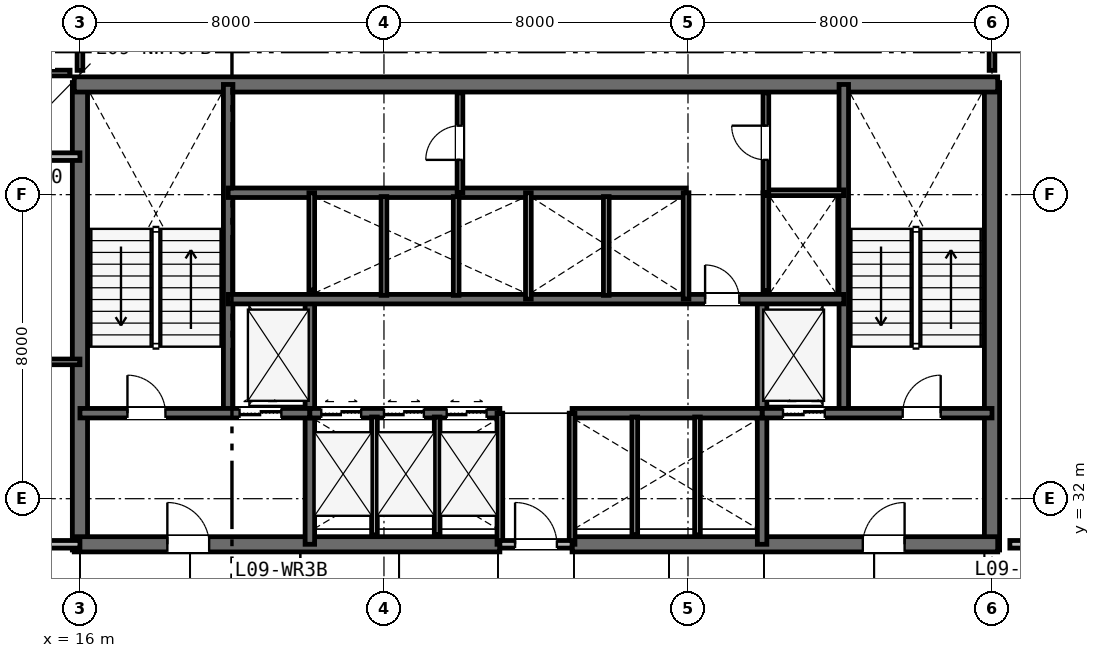
"""IFC4 building model, lengths in metres.
Left out: names, types, materials, properties, quantities, classifications, styles, units other than length and angle.
Written with IfcOpenShell. Run it as: python <this file> out.ifc"""

import sys

from ifc_helpers import new_model, si_unit, direction, frame, frame_2d, origin, place, context, subcontext, project, spatial, rectangle, extrude, element, fill, save


model = new_model("IFC4")
c1 = context("Model", 3, precision=1e-05, world=origin(), true_north=direction((0.0, 1.0)))
c2 = subcontext(c1, "Body", "Model", "MODEL_VIEW")
j1 = project(units=[si_unit("LENGTHUNIT", "METRE"), si_unit("PLANEANGLEUNIT", "RADIAN")], contexts=[c1])
p1 = place(None, origin())
s1 = spatial("IfcSite", under=j1, at=p1, CompositionType="ELEMENT")
p2 = place(p1, origin())
s2 = spatial("IfcBuilding", under=s1, at=p2, CompositionType="ELEMENT")
p3 = place(p2, frame((0.0, 0.0, 40.2)))
s3 = spatial("IfcBuildingStorey", under=s2, at=p3, CompositionType="ELEMENT", Elevation=40.2)
for number, where, z_axis, x_axis in (
    (1, (16.0, 30.65, 0.0), (0.0, 0.0, 1.0), (0.0, 1.0, 0.0)),
    (2, (40.0, 30.65, 0.0), (0.0, 0.0, 1.0), (0.0, 1.0, 0.0)),
):
    element("IfcWall", number, at=place(p3, frame(where, z_axis=z_axis, x_axis=x_axis)), inside=s3, PredefinedType="SHEAR", context=c2, shape_type="SweptSolid", body=[
        extrude(rectangle(XDim=12.3, YDim=0.4, at=frame_2d((6.15, 0.0))), origin(), (0.0, 0.0, 1.0), 3.6),
    ])
p4 = place(p3, frame((15.85, 42.9, 0.0), z_axis=(0.0, 0.0, 1.0), x_axis=(1.0, 0.0, 0.0)))
e3 = element("IfcWall", 3, at=p4, inside=s3, PredefinedType="SHEAR", context=c2, shape_type="SweptSolid", body=[
    extrude(rectangle(XDim=24.3, YDim=0.4, at=frame_2d((12.15, 0.0))), origin(), (0.0, 0.0, 1.0), 3.6),
])
p5 = place(p3, frame((15.85, 30.8, 0.0), z_axis=(0.0, 0.0, 1.0), x_axis=(1.0, 0.0, 0.0)))
e4 = element("IfcWall", 4, at=p5, inside=s3, PredefinedType="SHEAR", context=c2, shape_type="SweptSolid", body=[
    extrude(rectangle(XDim=11.2, YDim=0.4, at=frame_2d((5.6, 0.0))), origin(), (0.0, 0.0, 1.0), 3.6),
])
p6 = place(p5, frame((2.45, 0.0, 0.0)))
e5 = element("IfcOpeningElement", 5, at=p6, cuts=e4, PredefinedType="OPENING", context=c2, shape_type="SweptSolid", body=[
    extrude(rectangle(XDim=1.1, YDim=2.15, at=frame_2d((0.55, 1.075))), frame((0.0, 0.21, 0.0), z_axis=(0.0, -1.0, 0.0), x_axis=(1.0, 0.0, 0.0)), (0.0, 0.0, 1.0), 0.42),
])
p7 = place(p3, frame((28.95, 30.8, 0.0), z_axis=(0.0, 0.0, 1.0), x_axis=(1.0, 0.0, 0.0)))
e6 = element("IfcWall", 6, at=p7, inside=s3, PredefinedType="SHEAR", context=c2, shape_type="SweptSolid", body=[
    extrude(rectangle(XDim=11.2, YDim=0.4, at=frame_2d((5.6, 0.0))), origin(), (0.0, 0.0, 1.0), 3.6),
])
p8 = place(p7, frame((7.65, 0.0, 0.0)))
e7 = element("IfcOpeningElement", 7, at=p8, cuts=e6, PredefinedType="OPENING", context=c2, shape_type="SweptSolid", body=[
    extrude(rectangle(XDim=1.1, YDim=2.15, at=frame_2d((0.55, 1.075))), frame((0.0, 0.21, 0.0), z_axis=(0.0, -1.0, 0.0), x_axis=(1.0, 0.0, 0.0)), (0.0, 0.0, 1.0), 0.42),
])
for number, where, z_axis, x_axis in (
    (8, (19.9, 34.25, 0.0), (0.0, 0.0, 1.0), (0.0, 1.0, 0.0)),
    (9, (36.1, 34.25, 0.0), (0.0, 0.0, 1.0), (0.0, 1.0, 0.0)),
):
    element("IfcWall", number, at=place(p3, frame(where, z_axis=z_axis, x_axis=x_axis)), inside=s3, PredefinedType="SHEAR", context=c2, shape_type="SweptSolid", body=[
        extrude(rectangle(XDim=8.65, YDim=0.25, at=frame_2d((4.325, 0.0))), origin(), (0.0, 0.0, 1.0), 3.6),
    ])
for number, where, z_axis, x_axis in (
    (10, (22.05, 30.8, 0.0), (0.0, 0.0, 1.0), (0.0, 1.0, 0.0)),
    (11, (33.95, 30.8, 0.0), (0.0, 0.0, 1.0), (0.0, 1.0, 0.0)),
):
    element("IfcWall", number, at=place(p3, frame(where, z_axis=z_axis, x_axis=x_axis)), inside=s3, PredefinedType="SHEAR", context=c2, shape_type="SweptSolid", body=[
        extrude(rectangle(XDim=6.45, YDim=0.25, at=frame_2d((3.225, 0.0))), origin(), (0.0, 0.0, 1.0), 3.6),
    ])
p9 = place(p3, frame((16.0, 34.25, 0.0), z_axis=(0.0, 0.0, 1.0), x_axis=(1.0, 0.0, 0.0)))
e12 = element("IfcWall", 12, at=p9, inside=s3, PredefinedType="SHEAR", context=c2, shape_type="SweptSolid", body=[
    extrude(rectangle(XDim=6.05, YDim=0.25, at=frame_2d((3.025, 0.0))), origin(), (0.0, 0.0, 1.0), 3.6),
])
p10 = place(p9, frame((1.25, 0.0, 0.0)))
e13 = element("IfcOpeningElement", 13, at=p10, cuts=e12, PredefinedType="OPENING", context=c2, shape_type="SweptSolid", body=[
    extrude(rectangle(XDim=1.0, YDim=2.15, at=frame_2d((0.5, 1.075))), frame((0.0, 0.135, 0.0), z_axis=(0.0, -1.0, 0.0), x_axis=(1.0, 0.0, 0.0)), (0.0, 0.0, 1.0), 0.27),
])
p11 = place(p9, frame((4.2, 0.0, 0.0)))
e14 = element("IfcOpeningElement", 14, at=p11, cuts=e12, PredefinedType="OPENING", context=c2, shape_type="SweptSolid", body=[
    extrude(rectangle(XDim=1.1, YDim=2.15, at=frame_2d((0.55, 1.075))), frame((0.0, 0.135, 0.0), z_axis=(0.0, -1.0, 0.0), x_axis=(1.0, 0.0, 0.0)), (0.0, 0.0, 1.0), 0.27),
])
p12 = place(p3, frame((33.95, 34.25, 0.0), z_axis=(0.0, 0.0, 1.0), x_axis=(1.0, 0.0, 0.0)))
e15 = element("IfcWall", 15, at=p12, inside=s3, PredefinedType="SHEAR", context=c2, shape_type="SweptSolid", body=[
    extrude(rectangle(XDim=6.05, YDim=0.25, at=frame_2d((3.025, 0.0))), origin(), (0.0, 0.0, 1.0), 3.6),
])
p13 = place(p12, frame((3.7, 0.0, 0.0)))
e16 = element("IfcOpeningElement", 16, at=p13, cuts=e15, PredefinedType="OPENING", context=c2, shape_type="SweptSolid", body=[
    extrude(rectangle(XDim=1.0, YDim=2.15, at=frame_2d((0.5, 1.075))), frame((0.0, 0.135, 0.0), z_axis=(0.0, -1.0, 0.0), x_axis=(1.0, 0.0, 0.0)), (0.0, 0.0, 1.0), 0.27),
])
p14 = place(p12, frame((0.55, 0.0, 0.0)))
e17 = element("IfcOpeningElement", 17, at=p14, cuts=e15, PredefinedType="OPENING", context=c2, shape_type="SweptSolid", body=[
    extrude(rectangle(XDim=1.1, YDim=2.15, at=frame_2d((0.55, 1.075))), frame((0.0, 0.135, 0.0), z_axis=(0.0, -1.0, 0.0), x_axis=(1.0, 0.0, 0.0)), (0.0, 0.0, 1.0), 0.27),
])
p15 = place(p3, frame((22.05, 34.25, 0.0), z_axis=(0.0, 0.0, 1.0), x_axis=(1.0, 0.0, 0.0)))
e18 = element("IfcWall", 18, at=p15, inside=s3, PredefinedType="SHEAR", context=c2, shape_type="SweptSolid", body=[
    extrude(rectangle(XDim=5.0, YDim=0.25, at=frame_2d((2.5, 0.0))), origin(), (0.0, 0.0, 1.0), 3.6),
])
p16 = place(p15, frame((0.3, 0.0, 0.0)))
e19 = element("IfcOpeningElement", 19, at=p16, cuts=e18, PredefinedType="OPENING", context=c2, shape_type="SweptSolid", body=[
    extrude(rectangle(XDim=1.05, YDim=2.15, at=frame_2d((0.525, 1.075))), frame((0.0, 0.135, 0.0), z_axis=(0.0, -1.0, 0.0), x_axis=(1.0, 0.0, 0.0)), (0.0, 0.0, 1.0), 0.27),
])
p17 = place(p15, frame((1.95, 0.0, 0.0)))
e20 = element("IfcOpeningElement", 20, at=p17, cuts=e18, PredefinedType="OPENING", context=c2, shape_type="SweptSolid", body=[
    extrude(rectangle(XDim=1.05, YDim=2.15, at=frame_2d((0.525, 1.075))), frame((0.0, 0.135, 0.0), z_axis=(0.0, -1.0, 0.0), x_axis=(1.0, 0.0, 0.0)), (0.0, 0.0, 1.0), 0.27),
])
p18 = place(p15, frame((3.6, 0.0, 0.0)))
e21 = element("IfcOpeningElement", 21, at=p18, cuts=e18, PredefinedType="OPENING", context=c2, shape_type="SweptSolid", body=[
    extrude(rectangle(XDim=1.05, YDim=2.15, at=frame_2d((0.525, 1.075))), frame((0.0, 0.135, 0.0), z_axis=(0.0, -1.0, 0.0), x_axis=(1.0, 0.0, 0.0)), (0.0, 0.0, 1.0), 0.27),
])
p19 = place(p3, frame((28.95, 34.25, 0.0), z_axis=(0.0, 0.0, 1.0), x_axis=(1.0, 0.0, 0.0)))
e22 = element("IfcWall", 22, at=p19, inside=s3, PredefinedType="SHEAR", context=c2, shape_type="SweptSolid", body=[
    extrude(rectangle(XDim=5.0, YDim=0.25, at=frame_2d((2.5, 0.0))), origin(), (0.0, 0.0, 1.0), 3.6),
])
p20 = place(p3, frame((19.9, 37.25, 0.0), z_axis=(0.0, 0.0, 1.0), x_axis=(1.0, 0.0, 0.0)))
e23 = element("IfcWall", 23, at=p20, inside=s3, PredefinedType="SHEAR", context=c2, shape_type="SweptSolid", body=[
    extrude(rectangle(XDim=16.2, YDim=0.25, at=frame_2d((8.1, 0.0))), origin(), (0.0, 0.0, 1.0), 3.6),
])
p21 = place(p20, frame((12.55, 0.0, 0.0)))
e24 = element("IfcOpeningElement", 24, at=p21, cuts=e23, PredefinedType="OPENING", context=c2, shape_type="SweptSolid", body=[
    extrude(rectangle(XDim=0.9, YDim=2.15, at=frame_2d((0.45, 1.075))), frame((0.0, 0.135, 0.0), z_axis=(0.0, -1.0, 0.0), x_axis=(1.0, 0.0, 0.0)), (0.0, 0.0, 1.0), 0.27),
])
p22 = place(p3, frame((19.9, 40.05, 0.0), z_axis=(0.0, 0.0, 1.0), x_axis=(1.0, 0.0, 0.0)))
e25 = element("IfcWall", 25, at=p22, inside=s3, PredefinedType="SHEAR", context=c2, shape_type="SweptSolid", body=[
    extrude(rectangle(XDim=12.05, YDim=0.25, at=frame_2d((6.025, 0.0))), origin(), (0.0, 0.0, 1.0), 3.6),
])
for number, where, z_axis, x_axis in (
    (26, (27.05, 30.8, 0.0), (0.0, 0.0, 1.0), (0.0, 1.0, 0.0)),
    (27, (28.95, 30.8, 0.0), (0.0, 0.0, 1.0), (0.0, 1.0, 0.0)),
):
    element("IfcWall", number, at=place(p3, frame(where, z_axis=z_axis, x_axis=x_axis)), inside=s3, PredefinedType="PLUMBINGWALL", context=c2, shape_type="SweptSolid", body=[
        extrude(rectangle(XDim=3.45, YDim=0.15, at=frame_2d((1.725, 0.0))), origin(), (0.0, 0.0, 1.0), 3.33),
    ])
p23 = place(p3, frame((27.05, 30.8, 0.0), z_axis=(0.0, 0.0, 1.0), x_axis=(1.0, 0.0, 0.0)))
e28 = element("IfcWall", 28, at=p23, inside=s3, PredefinedType="PARTITIONING", context=c2, shape_type="SweptSolid", body=[
    extrude(rectangle(XDim=1.9, YDim=0.2, at=frame_2d((0.95, 0.0))), origin(), (0.0, 0.0, 1.0), 3.33),
])
p24 = place(p23, frame((0.4, 0.0, 0.0)))
e29 = element("IfcOpeningElement", 29, at=p24, cuts=e28, PredefinedType="OPENING", context=c2, shape_type="SweptSolid", body=[
    extrude(rectangle(XDim=1.1, YDim=2.15, at=frame_2d((0.55, 1.075))), frame((0.0, 0.11, 0.0), z_axis=(0.0, -1.0, 0.0), x_axis=(1.0, 0.0, 0.0)), (0.0, 0.0, 1.0), 0.22),
])
for number, where, z_axis, x_axis in (
    (30, (23.75, 31.05, 0.0), (0.0, 0.0, 1.0), (0.0, 1.0, 0.0)),
    (31, (25.4, 31.05, 0.0), (0.0, 0.0, 1.0), (0.0, 1.0, 0.0)),
    (32, (30.6, 31.05, 0.0), (0.0, 0.0, 1.0), (0.0, 1.0, 0.0)),
    (33, (32.25, 31.05, 0.0), (0.0, 0.0, 1.0), (0.0, 1.0, 0.0)),
):
    element("IfcWall", number, at=place(p3, frame(where, z_axis=z_axis, x_axis=x_axis)), inside=s3, PredefinedType="PLUMBINGWALL", context=c2, shape_type="SweptSolid", body=[
        extrude(rectangle(XDim=3.1, YDim=0.15, at=frame_2d((1.55, 0.0))), origin(), (0.0, 0.0, 1.0), 3.33),
    ])
p25 = place(p3, frame((22.1, 37.49, 0.0), z_axis=(0.0, 0.0, 1.0), x_axis=(0.0, 1.0, 0.0)))
e34 = element("IfcWall", 34, at=p25, inside=s3, PredefinedType="PLUMBINGWALL", context=c2, shape_type="SweptSolid", body=[
    extrude(rectangle(XDim=2.56, YDim=0.15, at=frame_2d((1.28, 0.0))), origin(), (0.0, 0.0, 1.0), 3.33),
])
p26 = place(p3, frame((27.8, 37.25, 0.0), z_axis=(0.0, 0.0, 1.0), x_axis=(0.0, 1.0, 0.0)))
e35 = element("IfcWall", 35, at=p26, inside=s3, PredefinedType="PLUMBINGWALL", context=c2, shape_type="SweptSolid", body=[
    extrude(rectangle(XDim=2.8, YDim=0.15, at=frame_2d((1.4, 0.0))), origin(), (0.0, 0.0, 1.0), 3.33),
])
for number, where, z_axis, x_axis in (
    (36, (24.0, 37.35, 0.0), (0.0, 0.0, 1.0), (0.0, 1.0, 0.0)),
    (37, (25.9, 37.35, 0.0), (0.0, 0.0, 1.0), (0.0, 1.0, 0.0)),
):
    element("IfcWall", number, at=place(p3, frame(where, z_axis=z_axis, x_axis=x_axis)), inside=s3, PredefinedType="PLUMBINGWALL", context=c2, shape_type="SweptSolid", body=[
        extrude(rectangle(XDim=2.6, YDim=0.15, at=frame_2d((1.3, 0.0))), origin(), (0.0, 0.0, 1.0), 3.33),
    ])
p27 = place(p3, frame((31.95, 37.25, 0.0), z_axis=(0.0, 0.0, 1.0), x_axis=(0.0, 1.0, 0.0)))
e38 = element("IfcWall", 38, at=p27, inside=s3, PredefinedType="PLUMBINGWALL", context=c2, shape_type="SweptSolid", body=[
    extrude(rectangle(XDim=2.8, YDim=0.15, at=frame_2d((1.4, 0.0))), origin(), (0.0, 0.0, 1.0), 3.33),
])
p28 = place(p3, frame((29.85, 37.35, 0.0), z_axis=(0.0, 0.0, 1.0), x_axis=(0.0, 1.0, 0.0)))
e39 = element("IfcWall", 39, at=p28, inside=s3, PredefinedType="PLUMBINGWALL", context=c2, shape_type="SweptSolid", body=[
    extrude(rectangle(XDim=2.6, YDim=0.15, at=frame_2d((1.3, 0.0))), origin(), (0.0, 0.0, 1.0), 3.33),
])
p29 = place(p3, frame((34.05, 37.473, 0.0), z_axis=(0.0, 0.0, 1.0), x_axis=(0.0, 1.0, 0.0)))
e40 = element("IfcWall", 40, at=p29, inside=s3, PredefinedType="PLUMBINGWALL", context=c2, shape_type="SweptSolid", body=[
    extrude(rectangle(XDim=2.577, YDim=0.15, at=frame_2d((1.288, 0.0))), origin(), (0.0, 0.0, 1.0), 3.33),
])
p30 = place(p3, frame((34.05, 40.05, 0.0), z_axis=(0.0, 0.0, 1.0), x_axis=(1.0, 0.0, 0.0)))
e41 = element("IfcWall", 41, at=p30, inside=s3, PredefinedType="PARTITIONING", context=c2, shape_type="SweptSolid", body=[
    extrude(rectangle(XDim=2.05, YDim=0.15, at=frame_2d((1.025, 0.0))), origin(), (0.0, 0.0, 1.0), 3.33),
])
p31 = place(p3, frame((34.05, 40.05, 0.0), z_axis=(0.0, 0.0, 1.0), x_axis=(0.0, 1.0, 0.0)))
e42 = element("IfcWall", 42, at=p31, inside=s3, PredefinedType="PARTITIONING", context=c2, shape_type="SweptSolid", body=[
    extrude(rectangle(XDim=2.63, YDim=0.15, at=frame_2d((1.315, 0.0))), origin(), (0.0, 0.0, 1.0), 3.33),
])
p32 = place(p31, frame((0.865, 0.0, 0.0)))
e43 = element("IfcOpeningElement", 43, at=p32, cuts=e42, PredefinedType="OPENING", context=c2, shape_type="SweptSolid", body=[
    extrude(rectangle(XDim=0.9, YDim=2.15, at=frame_2d((0.45, 1.075))), frame((0.0, 0.085, 0.0), z_axis=(0.0, -1.0, 0.0), x_axis=(1.0, 0.0, 0.0)), (0.0, 0.0, 1.0), 0.17),
])
p33 = place(p3, frame((26.0, 40.05, 0.0), z_axis=(0.0, 0.0, 1.0), x_axis=(0.0, 1.0, 0.0)))
e44 = element("IfcWall", 44, at=p33, inside=s3, PredefinedType="PARTITIONING", context=c2, shape_type="SweptSolid", body=[
    extrude(rectangle(XDim=2.63, YDim=0.15, at=frame_2d((1.315, 0.0))), origin(), (0.0, 0.0, 1.0), 3.33),
])
p34 = place(p33, frame((0.865, 0.0, 0.0)))
e45 = element("IfcOpeningElement", 45, at=p34, cuts=e44, PredefinedType="OPENING", context=c2, shape_type="SweptSolid", body=[
    extrude(rectangle(XDim=0.9, YDim=2.15, at=frame_2d((0.45, 1.075))), frame((0.0, 0.085, 0.0), z_axis=(0.0, -1.0, 0.0), x_axis=(1.0, 0.0, 0.0)), (0.0, 0.0, 1.0), 0.17),
])
p35 = place(p3, frame((8.3, 35.6, 0.0), z_axis=(0.0, 0.0, 1.0), x_axis=(1.0, 0.0, 0.0)))
e46 = element("IfcWall", 46, at=p35, inside=s3, PredefinedType="PARTITIONING", context=c2, shape_type="SweptSolid", body=[
    extrude(rectangle(XDim=7.7, YDim=0.15, at=frame_2d((3.85, 0.0))), origin(), (0.0, 0.0, 1.0), 2.82),
])
p36 = place(p3, frame((8.3, 30.8, 0.0), z_axis=(0.0, 0.0, 1.0), x_axis=(1.0, 0.0, 0.0)))
e47 = element("IfcWall", 47, at=p36, inside=s3, PredefinedType="PARTITIONING", context=c2, shape_type="SweptSolid", body=[
    extrude(rectangle(XDim=7.7, YDim=0.2, at=frame_2d((3.85, 0.0))), origin(), (0.0, 0.0, 1.0), 2.82),
])
p37 = place(p36, frame((5.325, 0.0, 0.0)))
e48 = element("IfcOpeningElement", 48, at=p37, cuts=e47, PredefinedType="OPENING", context=c2, shape_type="SweptSolid", body=[
    extrude(rectangle(XDim=0.95, YDim=2.15, at=frame_2d((0.475, 1.075))), frame((0.0, 0.11, 0.0), z_axis=(0.0, -1.0, 0.0), x_axis=(1.0, 0.0, 0.0)), (0.0, 0.0, 1.0), 0.22),
])
p38 = place(p3, frame((0.1, 41.0, 0.0), z_axis=(0.0, 0.0, 1.0), x_axis=(1.0, 0.0, 0.0)))
e49 = element("IfcWall", 49, at=p38, inside=s3, PredefinedType="PARTITIONING", context=c2, shape_type="SweptSolid", body=[
    extrude(rectangle(XDim=15.9, YDim=0.2, at=frame_2d((7.95, 0.0))), origin(), (0.0, 0.0, 1.0), 2.82),
])
p39 = place(p38, frame((6.779, 0.0, 0.0)))
e50 = element("IfcOpeningElement", 50, at=p39, cuts=e49, PredefinedType="OPENING", context=c2, shape_type="SweptSolid", body=[
    extrude(rectangle(XDim=0.95, YDim=2.15, at=frame_2d((0.475, 1.075))), frame((0.0, 0.11, 0.0), z_axis=(0.0, -1.0, 0.0), x_axis=(1.0, 0.0, 0.0)), (0.0, 0.0, 1.0), 0.22),
])
p40 = place(p3, frame((13.55, 43.2, 0.0), z_axis=(0.0, 0.0, 1.0), x_axis=(1.0, 0.0, 0.0)))
e51 = element("IfcWall", 51, at=p40, inside=s3, PredefinedType="PARTITIONING", context=c2, shape_type="SweptSolid", body=[
    extrude(rectangle(XDim=2.19, YDim=0.15, at=frame_2d((1.095, 0.0))), origin(), (0.0, 0.0, 1.0), 3.33),
])
for number, where, z_axis, x_axis in (
    (52, (16.0, 43.27, 0.0), (0.0, 0.0, 1.0), (0.0, 1.0, 0.0)),
    (53, (40.0, 43.27, 0.0), (0.0, 0.0, 1.0), (0.0, 1.0, 0.0)),
):
    element("IfcWall", number, at=place(p3, frame(where, z_axis=z_axis, x_axis=x_axis)), inside=s3, PredefinedType="PARTITIONING", context=c2, shape_type="SweptSolid", body=[
        extrude(rectangle(XDim=4.63, YDim=0.15, at=frame_2d((2.315, 0.0))), origin(), (0.0, 0.0, 1.0), 2.93),
    ])
p41 = place(p3, frame((40.47, 30.8, 0.0), z_axis=(0.0, 0.0, 1.0), x_axis=(1.0, 0.0, 0.0)))
e54 = element("IfcWall", 54, at=p41, inside=s3, PredefinedType="PARTITIONING", context=c2, shape_type="SweptSolid", body=[
    extrude(rectangle(XDim=15.43, YDim=0.2, at=frame_2d((7.715, 0.0))), origin(), (0.0, 0.0, 1.0), 2.82),
])
p42 = place(p41, frame((6.673, 0.0, 0.0)))
e55 = element("IfcOpeningElement", 55, at=p42, cuts=e54, PredefinedType="OPENING", context=c2, shape_type="SweptSolid", body=[
    extrude(rectangle(XDim=0.95, YDim=2.15, at=frame_2d((0.475, 1.075))), frame((0.0, 0.11, 0.0), z_axis=(0.0, -1.0, 0.0), x_axis=(1.0, 0.0, 0.0)), (0.0, 0.0, 1.0), 0.22),
])
p43 = place(p24, origin())
e56 = element("IfcDoor", 56, at=p43, inside=s3, OperationType="SINGLE_SWING_LEFT", PredefinedType="DOOR", context=c2, shape_type="SweptSolid", body=[
    extrude(rectangle(XDim=1.1, YDim=2.15, at=frame_2d((0.55, 1.075))), frame((0.0, 0.025, 0.0), z_axis=(0.0, -1.0, 0.0), x_axis=(1.0, 0.0, 0.0)), (0.0, 0.0, 1.0), 0.05),
])
fill(e29, e56)
p44 = place(p10, origin())
e57 = element("IfcDoor", 57, at=p44, inside=s3, OperationType="SINGLE_SWING_LEFT", PredefinedType="DOOR", context=c2, shape_type="SweptSolid", body=[
    extrude(rectangle(XDim=1.0, YDim=2.15, at=frame_2d((0.5, 1.075))), frame((0.0, 0.025, 0.0), z_axis=(0.0, -1.0, 0.0), x_axis=(1.0, 0.0, 0.0)), (0.0, 0.0, 1.0), 0.05),
])
fill(e13, e57)
p45 = place(p13, origin())
e58 = element("IfcDoor", 58, at=p45, inside=s3, OperationType="SINGLE_SWING_RIGHT", PredefinedType="DOOR", context=c2, shape_type="SweptSolid", body=[
    extrude(rectangle(XDim=1.0, YDim=2.15, at=frame_2d((0.5, 1.075))), frame((0.0, 0.025, 0.0), z_axis=(0.0, -1.0, 0.0), x_axis=(1.0, 0.0, 0.0)), (0.0, 0.0, 1.0), 0.05),
])
fill(e16, e58)
p46 = place(p6, origin())
e59 = element("IfcDoor", 59, at=p46, inside=s3, OperationType="SINGLE_SWING_LEFT", PredefinedType="DOOR", context=c2, shape_type="SweptSolid", body=[
    extrude(rectangle(XDim=1.1, YDim=2.15, at=frame_2d((0.55, 1.075))), frame((0.0, 0.025, 0.0), z_axis=(0.0, -1.0, 0.0), x_axis=(1.0, 0.0, 0.0)), (0.0, 0.0, 1.0), 0.05),
])
fill(e5, e59)
p47 = place(p8, origin())
e60 = element("IfcDoor", 60, at=p47, inside=s3, OperationType="SINGLE_SWING_RIGHT", PredefinedType="DOOR", context=c2, shape_type="SweptSolid", body=[
    extrude(rectangle(XDim=1.1, YDim=2.15, at=frame_2d((0.55, 1.075))), frame((0.0, 0.025, 0.0), z_axis=(0.0, -1.0, 0.0), x_axis=(1.0, 0.0, 0.0)), (0.0, 0.0, 1.0), 0.05),
])
fill(e7, e60)
p48 = place(p21, origin())
e61 = element("IfcDoor", 61, at=p48, inside=s3, OperationType="SINGLE_SWING_LEFT", PredefinedType="DOOR", context=c2, shape_type="SweptSolid", body=[
    extrude(rectangle(XDim=0.9, YDim=2.15, at=frame_2d((0.45, 1.075))), frame((0.0, 0.025, 0.0), z_axis=(0.0, -1.0, 0.0), x_axis=(1.0, 0.0, 0.0)), (0.0, 0.0, 1.0), 0.05),
])
fill(e24, e61)
p49 = place(p32, origin())
e62 = element("IfcDoor", 62, at=p49, inside=s3, OperationType="SINGLE_SWING_RIGHT", PredefinedType="DOOR", context=c2, shape_type="SweptSolid", body=[
    extrude(rectangle(XDim=0.9, YDim=2.15, at=frame_2d((0.45, 1.075))), frame((0.0, 0.025, 0.0), z_axis=(0.0, -1.0, 0.0), x_axis=(1.0, 0.0, 0.0)), (0.0, 0.0, 1.0), 0.05),
])
fill(e43, e62)
p50 = place(p34, origin())
e63 = element("IfcDoor", 63, at=p50, inside=s3, OperationType="SINGLE_SWING_LEFT", PredefinedType="DOOR", context=c2, shape_type="SweptSolid", body=[
    extrude(rectangle(XDim=0.9, YDim=2.15, at=frame_2d((0.45, 1.075))), frame((0.0, 0.025, 0.0), z_axis=(0.0, -1.0, 0.0), x_axis=(1.0, 0.0, 0.0)), (0.0, 0.0, 1.0), 0.05),
])
fill(e45, e63)
p51 = place(p11, origin())
e64 = element("IfcDoor", 64, at=p51, inside=s3, OperationType="DOUBLE_DOOR_SLIDING", PredefinedType="DOOR", context=c2, shape_type="SweptSolid", body=[
    extrude(rectangle(XDim=1.1, YDim=2.15, at=frame_2d((0.55, 1.075))), frame((0.0, 0.025, 0.0), z_axis=(0.0, -1.0, 0.0), x_axis=(1.0, 0.0, 0.0)), (0.0, 0.0, 1.0), 0.05),
])
fill(e14, e64)
p52 = place(p14, origin())
e65 = element("IfcDoor", 65, at=p52, inside=s3, OperationType="DOUBLE_DOOR_SLIDING", PredefinedType="DOOR", context=c2, shape_type="SweptSolid", body=[
    extrude(rectangle(XDim=1.1, YDim=2.15, at=frame_2d((0.55, 1.075))), frame((0.0, 0.025, 0.0), z_axis=(0.0, -1.0, 0.0), x_axis=(1.0, 0.0, 0.0)), (0.0, 0.0, 1.0), 0.05),
])
fill(e17, e65)
p53 = place(p16, origin())
e66 = element("IfcDoor", 66, at=p53, inside=s3, OperationType="DOUBLE_DOOR_SLIDING", PredefinedType="DOOR", context=c2, shape_type="SweptSolid", body=[
    extrude(rectangle(XDim=1.05, YDim=2.15, at=frame_2d((0.525, 1.075))), frame((0.0, 0.025, 0.0), z_axis=(0.0, -1.0, 0.0), x_axis=(1.0, 0.0, 0.0)), (0.0, 0.0, 1.0), 0.05),
])
fill(e19, e66)
p54 = place(p17, origin())
e67 = element("IfcDoor", 67, at=p54, inside=s3, OperationType="DOUBLE_DOOR_SLIDING", PredefinedType="DOOR", context=c2, shape_type="SweptSolid", body=[
    extrude(rectangle(XDim=1.05, YDim=2.15, at=frame_2d((0.525, 1.075))), frame((0.0, 0.025, 0.0), z_axis=(0.0, -1.0, 0.0), x_axis=(1.0, 0.0, 0.0)), (0.0, 0.0, 1.0), 0.05),
])
fill(e20, e67)
p55 = place(p18, origin())
e68 = element("IfcDoor", 68, at=p55, inside=s3, OperationType="DOUBLE_DOOR_SLIDING", PredefinedType="DOOR", context=c2, shape_type="SweptSolid", body=[
    extrude(rectangle(XDim=1.05, YDim=2.15, at=frame_2d((0.525, 1.075))), frame((0.0, 0.025, 0.0), z_axis=(0.0, -1.0, 0.0), x_axis=(1.0, 0.0, 0.0)), (0.0, 0.0, 1.0), 0.05),
])
fill(e21, e68)
save(model, sys.argv[1])
